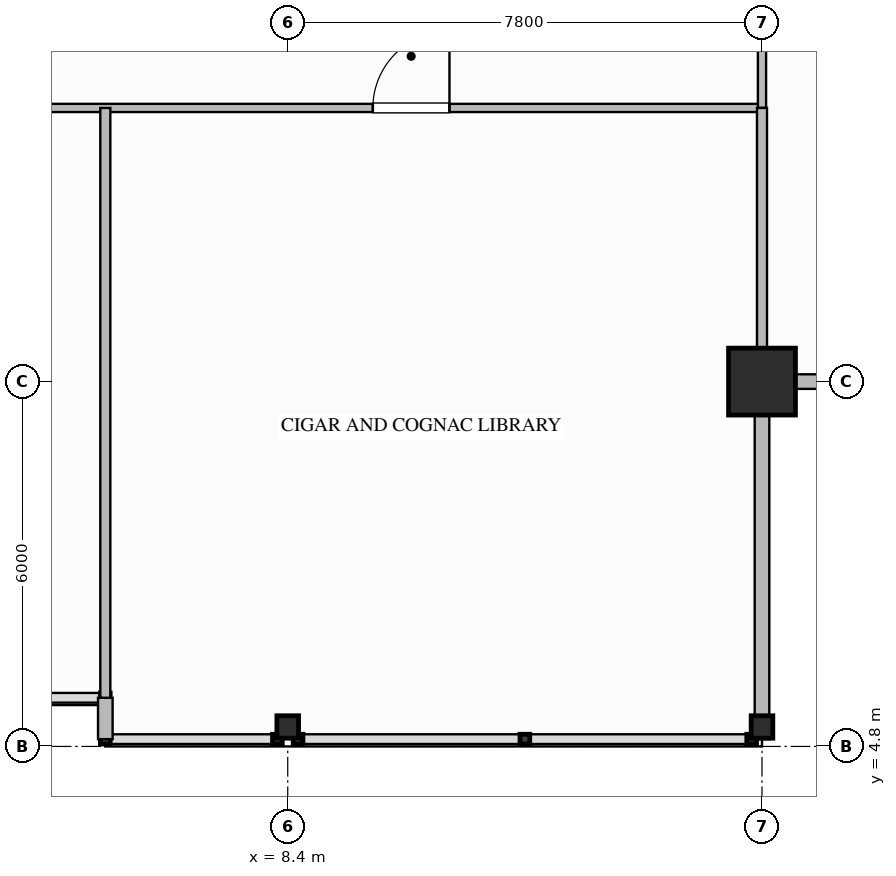
"""IFC4 building model, lengths in metres.
Left out: names, types, materials, properties, quantities, classifications, styles, units other than length and angle.
Written with IfcOpenShell. Run it as: python <this file> out.ifc"""

import sys

from ifc_helpers import new_model, si_unit, direction, frame, frame_2d, origin, origin_2d, place, context, subcontext, project, spatial, rectangle, i_section, extrude, element, fill, save


model = new_model("IFC4")
c1 = context("Model", 3, precision=1e-05, world=origin(), true_north=direction((0.0, 1.0)))
c2 = subcontext(c1, "Body", "Model", "MODEL_VIEW")
j1 = project(units=[si_unit("LENGTHUNIT", "METRE"), si_unit("PLANEANGLEUNIT", "RADIAN")], contexts=[c1])
p1 = place(None, origin())
s1 = spatial("IfcSite", under=j1, at=p1, CompositionType="ELEMENT")
p2 = place(p1, origin())
s2 = spatial("IfcBuilding", under=s1, at=p2, CompositionType="ELEMENT")
p3 = place(p2, frame((0.0, 0.0, 298.6)))
s3 = spatial("IfcBuildingStorey", under=s2, at=p3, CompositionType="ELEMENT", Elevation=298.6)
p4 = place(p3, frame((16.2, 10.8, 0.0), z_axis=(0.0, 0.0, 1.0), x_axis=(1.0, 0.0, 0.0)))
e1 = element("IfcColumn", 1, at=p4, inside=s3, PredefinedType="COLUMN", context=c2, shape_type="SweptSolid", body=[
    extrude(rectangle(XDim=1.1, YDim=1.1, at=origin_2d()), origin(), (0.0, 0.0, 1.0), 4.4),
])
for number, where, z_axis, x_axis in (
    (2, (8.4, 5.12, 0.0), (0.0, 0.0, 1.0), (0.0, 1.0, 0.0)),
    (3, (16.2, 5.12, 0.0), (0.0, 0.0, 1.0), (0.0, 1.0, 0.0)),
):
    element("IfcColumn", number, at=place(p3, frame(where, z_axis=z_axis, x_axis=x_axis)), inside=s3, PredefinedType="COLUMN", context=c2, shape_type="SweptSolid", body=[
        extrude(i_section(OverallWidth=0.369, OverallDepth=0.356, WebThickness=0.011, FlangeThickness=0.018, FilletRadius=0.025, at=origin_2d()), origin(), (0.0, 0.0, 1.0), 4.397),
    ])
for number, where, z_axis, x_axis in (
    (4, (22.08, 10.8, 0.0), (0.0, 0.0, 1.0), (-1.0, 0.0, 0.0)),
    (5, (16.2, 10.8, 0.0), (0.0, 0.0, 1.0), (0.0, -1.0, 0.0)),
):
    element("IfcWall", number, at=place(p3, frame(where, z_axis=z_axis, x_axis=x_axis)), inside=s3, PredefinedType="STANDARD", context=c2, shape_type="SweptSolid", body=[
        extrude(rectangle(XDim=5.88, YDim=0.24, at=frame_2d((2.94, 0.0))), origin(), (0.0, 0.0, 1.0), 3.439),
    ])
p5 = place(p3, frame((5.4, 4.92, 0.0), z_axis=(0.0, 0.0, 1.0), x_axis=(0.0, 1.0, 0.0)))
e6 = element("IfcWall", 6, at=p5, inside=s3, PredefinedType="STANDARD", context=c2, shape_type="SweptSolid", body=[
    extrude(rectangle(XDim=0.68, YDim=0.24, at=frame_2d((0.34, 0.0))), origin(), (0.0, 0.0, 1.0), 4.05),
])
p6 = place(p3, frame((-16.2, 15.3, 0.0), z_axis=(0.0, 0.0, 1.0), x_axis=(1.0, 0.0, 0.0)))
e7 = element("IfcWall", 7, at=p6, inside=s3, PredefinedType="PARTITIONING", context=c2, shape_type="SweptSolid", body=[
    extrude(rectangle(XDim=32.4, YDim=0.135, at=frame_2d((16.2, 0.0))), origin(), (0.0, 0.0, 1.0), 4.05),
])
p7 = place(p6, frame((4.0, 0.0, 0.0)))
e8 = element("IfcOpeningElement", 8, at=p7, cuts=e7, PredefinedType="OPENING", context=c2, shape_type="SweptSolid", body=[
    extrude(rectangle(XDim=1.26, YDim=2.2, at=frame_2d((0.63, 1.1))), frame((0.0, 0.077, 0.0), z_axis=(0.0, -1.0, 0.0), x_axis=(1.0, 0.0, 0.0)), (0.0, 0.0, 1.0), 0.155),
])
p8 = place(p6, frame((15.5, 0.0, 0.0)))
e9 = element("IfcOpeningElement", 9, at=p8, cuts=e7, PredefinedType="OPENING", context=c2, shape_type="SweptSolid", body=[
    extrude(rectangle(XDim=1.26, YDim=2.2, at=frame_2d((0.63, 1.1))), frame((0.0, 0.077, 0.0), z_axis=(0.0, -1.0, 0.0), x_axis=(1.0, 0.0, 0.0)), (0.0, 0.0, 1.0), 0.155),
])
p9 = place(p6, frame((26.0, 0.0, 0.0)))
e10 = element("IfcOpeningElement", 10, at=p9, cuts=e7, PredefinedType="OPENING", context=c2, shape_type="SweptSolid", body=[
    extrude(rectangle(XDim=1.26, YDim=2.2, at=frame_2d((0.63, 1.1))), frame((0.0, 0.077, 0.0), z_axis=(0.0, -1.0, 0.0), x_axis=(1.0, 0.0, 0.0)), (0.0, 0.0, 1.0), 0.155),
])
p10 = place(p3, frame((16.2, 15.3, 0.0), z_axis=(0.0, 0.0, 1.0), x_axis=(0.0, 1.0, 0.0)))
e11 = element("IfcWall", 11, at=p10, inside=s3, PredefinedType="PARTITIONING", context=c2, shape_type="SweptSolid", body=[
    extrude(rectangle(XDim=3.1, YDim=0.135, at=frame_2d((1.55, 0.0))), origin(), (0.0, 0.0, 1.0), 3.424),
])
p11 = place(p3, frame((16.2, 10.92, 0.0), z_axis=(0.0, 0.0, 1.0), x_axis=(0.0, 1.0, 0.0)))
e12 = element("IfcWall", 12, at=p11, inside=s3, PredefinedType="PARTITIONING", context=c2, shape_type="SweptSolid", body=[
    extrude(rectangle(XDim=4.38, YDim=0.165, at=frame_2d((2.19, 0.0))), origin(), (0.0, 0.0, 1.0), 3.424),
])
p12 = place(p3, frame((5.4, 5.6, 0.0), z_axis=(0.0, 0.0, 1.0), x_axis=(0.0, 1.0, 0.0)))
e13 = element("IfcWall", 13, at=p12, inside=s3, PredefinedType="PARTITIONING", context=c2, shape_type="SweptSolid", body=[
    extrude(rectangle(XDim=9.7, YDim=0.165, at=frame_2d((4.85, 0.0))), origin(), (0.0, 0.0, 1.0), 4.05),
])
p13 = place(p9, origin())
e14 = element("IfcDoor", 14, at=p13, inside=s3, OperationType="SINGLE_SWING_RIGHT", PredefinedType="DOOR", context=c2, shape_type="SweptSolid", body=[
    extrude(rectangle(XDim=1.26, YDim=2.2, at=frame_2d((0.63, 1.1))), frame((0.0, 0.025, 0.0), z_axis=(0.0, -1.0, 0.0), x_axis=(1.0, 0.0, 0.0)), (0.0, 0.0, 1.0), 0.05),
])
fill(e10, e14)
save(model, sys.argv[1])
